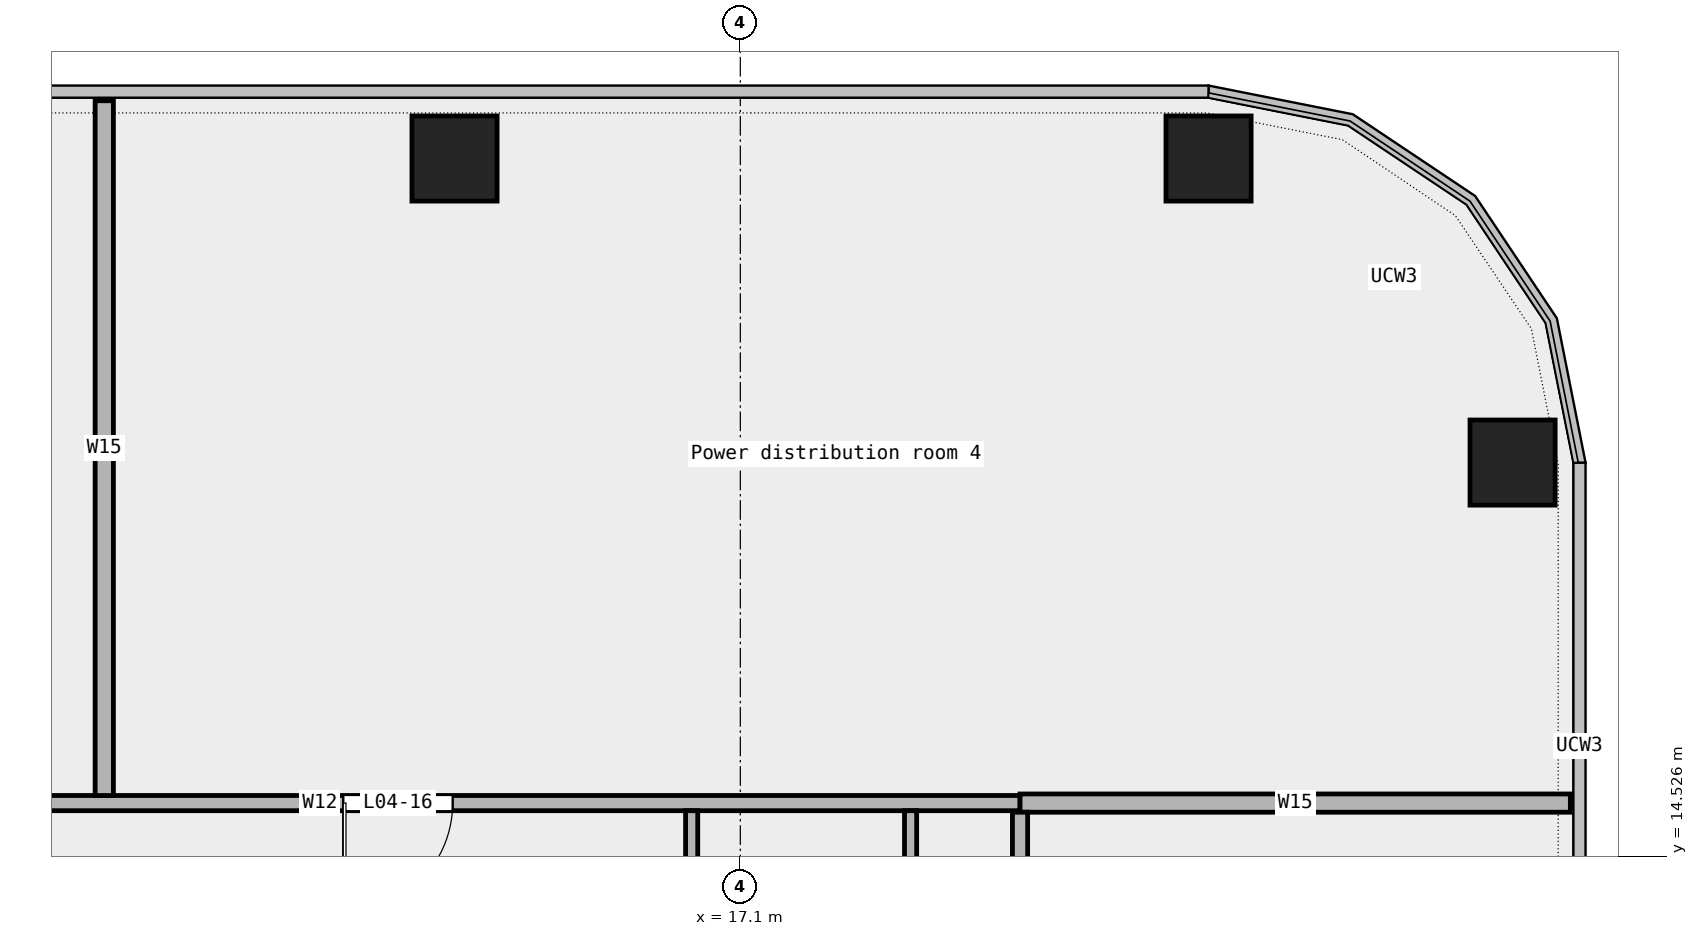
"""IFC4 building model, lengths in metres.
Left out: names, types, materials, properties, quantities, classifications, styles, units other than length and angle.
Written with IfcOpenShell. Run it as: python <this file> out.ifc"""

import sys

from ifc_helpers import new_model, si_unit, direction, frame, frame_2d, origin, origin_2d, place, context, subcontext, project, spatial, rectangle, extrude, element, fill, save


model = new_model("IFC4")
c1 = context("Model", 3, precision=1e-05, world=origin(), true_north=direction((0.0, 1.0)))
c2 = subcontext(c1, "Body", "Model", "MODEL_VIEW")
j1 = project(units=[si_unit("LENGTHUNIT", "METRE"), si_unit("PLANEANGLEUNIT", "RADIAN")], contexts=[c1])
p1 = place(None, origin())
s1 = spatial("IfcSite", under=j1, at=p1, CompositionType="ELEMENT")
p2 = place(p1, origin())
s2 = spatial("IfcBuilding", under=s1, at=p2, CompositionType="ELEMENT")
p3 = place(p2, frame((0.0, 0.0, 25.5)))
s3 = spatial("IfcBuildingStorey", under=s2, at=p3, CompositionType="ELEMENT", Elevation=25.5)
for number, where, z_axis, x_axis in (
    (1, (29.8, 21.0, 0.0), (0.0, 0.0, 1.0), (1.0, 0.0, 0.0)),
    (2, (24.8, 26.0, 0.0), (0.0, 0.0, 1.0), (1.0, 0.0, 0.0)),
    (3, (12.4, 26.0, 0.0), (0.0, 0.0, 1.0), (1.0, 0.0, 0.0)),
):
    element("IfcColumn", number, at=place(p3, frame(where, z_axis=z_axis, x_axis=x_axis)), inside=s3, PredefinedType="COLUMN", context=c2, shape_type="SweptSolid", body=[
        extrude(rectangle(XDim=1.4, YDim=1.4, at=origin_2d()), origin(), (0.0, 0.0, 1.0), 5.05),
    ])
p4 = place(p3, frame((-1.33, 15.4, 0.0), z_axis=(0.0, 0.0, 1.0), x_axis=(1.0, 0.0, 0.0)))
e4 = element("IfcWall", 4, at=p4, inside=s3, PredefinedType="PARTITIONING", context=c2, shape_type="SweptSolid", body=[
    extrude(rectangle(XDim=23.03, YDim=0.25, at=frame_2d((11.515, 0.0))), origin(), (0.0, 0.0, 1.0), 5.05),
])
p5 = place(p4, frame((3.385, 0.0, 0.0)))
e5 = element("IfcOpeningElement", 5, at=p5, cuts=e4, PredefinedType="OPENING", context=c2, shape_type="SweptSolid", body=[
    extrude(rectangle(XDim=1.2, YDim=2.1, at=frame_2d((0.6, 1.05))), frame((0.0, 0.137, 0.0), z_axis=(0.0, -1.0, 0.0), x_axis=(1.0, 0.0, 0.0)), (0.0, 0.0, 1.0), 0.274),
])
p6 = place(p4, frame((11.9, 0.0, 0.0)))
e6 = element("IfcOpeningElement", 6, at=p6, cuts=e4, PredefinedType="OPENING", context=c2, shape_type="SweptSolid", body=[
    extrude(rectangle(XDim=1.8, YDim=2.1, at=frame_2d((0.9, 1.05))), frame((0.0, 0.137, 0.0), z_axis=(0.0, -1.0, 0.0), x_axis=(1.0, 0.0, 0.0)), (0.0, 0.0, 1.0), 0.274),
])
p7 = place(p3, frame((21.7, 15.4, 0.0), z_axis=(0.0, 0.0, 1.0), x_axis=(1.0, 0.0, 0.0)))
e7 = element("IfcWall", 7, at=p7, inside=s3, PredefinedType="PARTITIONING", context=c2, shape_type="SweptSolid", body=[
    extrude(rectangle(XDim=9.05, YDim=0.3, at=frame_2d((4.525, 0.0))), origin(), (0.0, 0.0, 1.0), 5.05),
])
p8 = place(p3, frame((6.64, 15.525, 0.0), z_axis=(0.0, 0.0, 1.0), x_axis=(0.0, 1.0, 0.0)))
e8 = element("IfcWall", 8, at=p8, inside=s3, PredefinedType="PARTITIONING", context=c2, shape_type="SweptSolid", body=[
    extrude(rectangle(XDim=11.425, YDim=0.3, at=frame_2d((5.712, 0.0))), origin(), (0.0, 0.0, 1.0), 5.05),
])
p9 = place(p3, frame((16.3, 11.8, 0.0), z_axis=(0.0, 0.0, 1.0), x_axis=(0.0, 1.0, 0.0)))
e9 = element("IfcWall", 9, at=p9, inside=s3, PredefinedType="PARTITIONING", context=c2, shape_type="SweptSolid", body=[
    extrude(rectangle(XDim=3.475, YDim=0.2, at=frame_2d((1.737, 0.0))), origin(), (0.0, 0.0, 1.0), 5.05),
])
p10 = place(p3, frame((19.9, 9.94, 0.0), z_axis=(0.0, 0.0, 1.0), x_axis=(0.0, 1.0, 0.0)))
e10 = element("IfcWall", 10, at=p10, inside=s3, PredefinedType="PARTITIONING", context=c2, shape_type="SweptSolid", body=[
    extrude(rectangle(XDim=5.335, YDim=0.2, at=frame_2d((2.667, 0.0))), origin(), (0.0, 0.0, 1.0), 5.05),
])
p11 = place(p10, frame((2.218, 0.0, 0.0)))
e11 = element("IfcOpeningElement", 11, at=p11, cuts=e10, PredefinedType="OPENING", context=c2, shape_type="SweptSolid", body=[
    extrude(rectangle(XDim=0.9, YDim=2.1, at=frame_2d((0.45, 1.05))), frame((0.0, 0.112, 0.0), z_axis=(0.0, -1.0, 0.0), x_axis=(1.0, 0.0, 0.0)), (0.0, 0.0, 1.0), 0.224),
])
p12 = place(p3, frame((21.7, 11.79, 0.0), z_axis=(0.0, 0.0, 1.0), x_axis=(0.0, 1.0, 0.0)))
e12 = element("IfcWall", 12, at=p12, inside=s3, PredefinedType="PARTITIONING", context=c2, shape_type="SweptSolid", body=[
    extrude(rectangle(XDim=3.46, YDim=0.25, at=frame_2d((1.73, 0.0))), origin(), (0.0, 0.0, 1.0), 5.05),
])
p13 = place(p12, frame((1.13, 0.0, 0.0)))
e13 = element("IfcOpeningElement", 13, at=p13, cuts=e12, PredefinedType="OPENING", context=c2, shape_type="SweptSolid", body=[
    extrude(rectangle(XDim=1.2, YDim=2.1, at=frame_2d((0.6, 1.05))), frame((0.0, 0.137, 0.0), z_axis=(0.0, -1.0, 0.0), x_axis=(1.0, 0.0, 0.0)), (0.0, 0.0, 1.0), 0.274),
])
p14 = place(p6, origin())
e14 = element("IfcDoor", 14, at=p14, inside=s3, OperationType="DOUBLE_DOOR_SINGLE_SWING", PredefinedType="DOOR", context=c2, shape_type="SweptSolid", body=[
    extrude(rectangle(XDim=1.8, YDim=2.1, at=frame_2d((0.9, 1.05))), frame((0.0, 0.025, 0.0), z_axis=(0.0, -1.0, 0.0), x_axis=(1.0, 0.0, 0.0)), (0.0, 0.0, 1.0), 0.05),
])
fill(e6, e14)
save(model, sys.argv[1])
